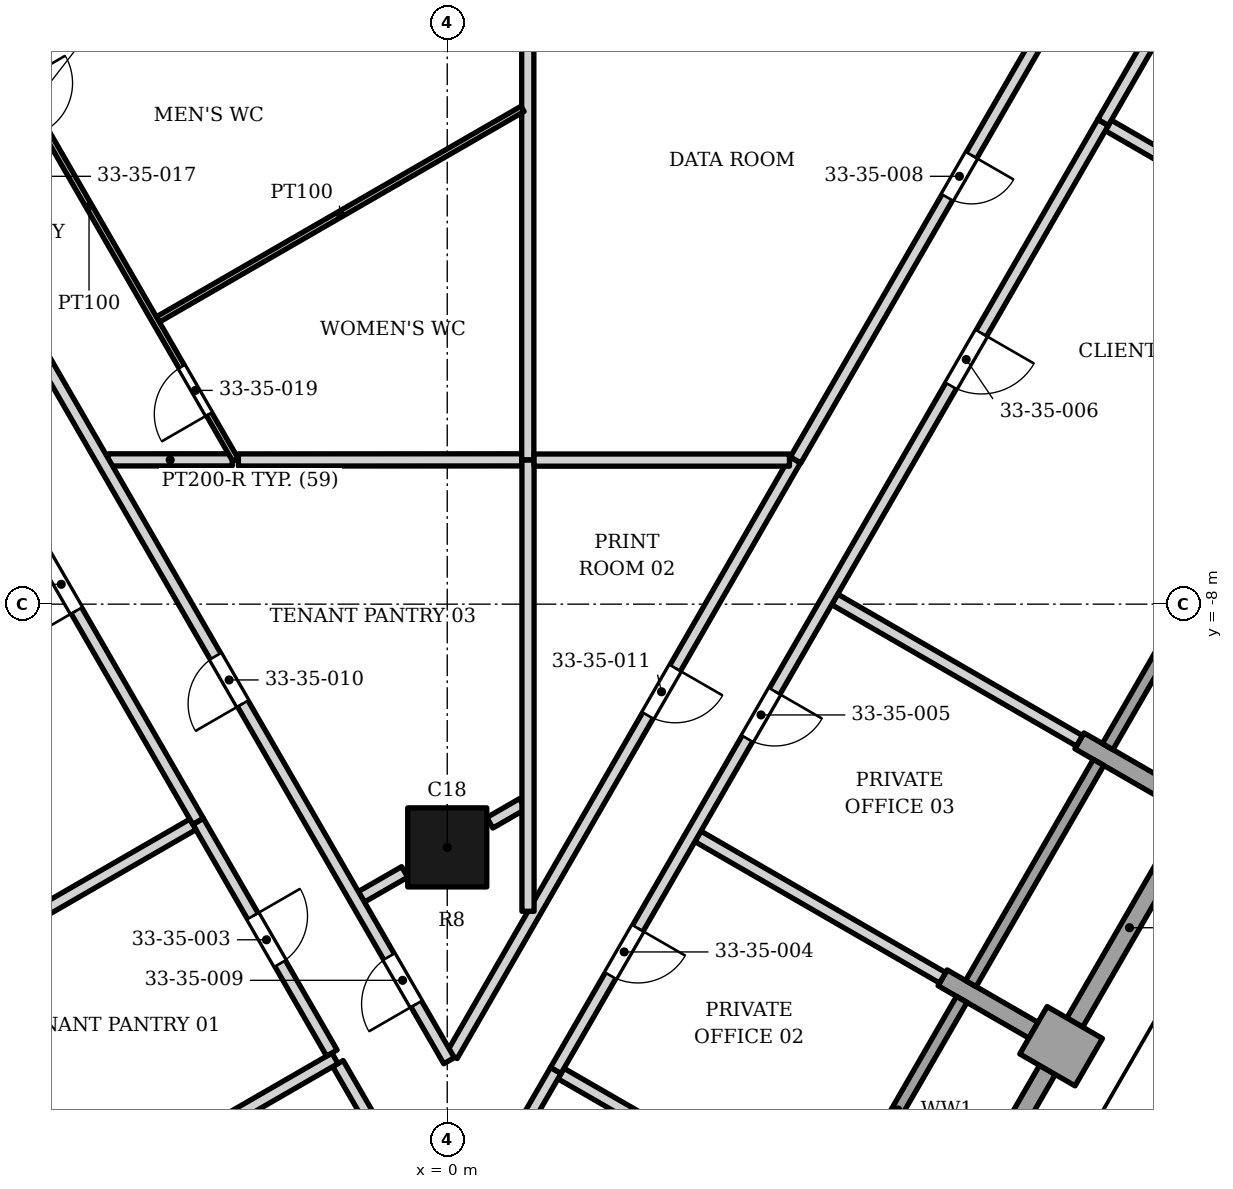
"""IFC4 building model, lengths in metres.
Left out: names, types, materials, properties, quantities, classifications, styles, units other than length and angle.
Written with IfcOpenShell. Run it as: python <this file> out.ifc"""

import sys

from ifc_helpers import new_model, si_unit, direction, frame, frame_2d, origin, origin_2d, place, context, subcontext, project, spatial, rectangle, extrude, element, fill, save


model = new_model("IFC4")
c1 = context("Model", 3, precision=1e-05, world=origin(), true_north=direction((0.0, 1.0)))
c2 = subcontext(c1, "Body", "Model", "MODEL_VIEW")
j1 = project(units=[si_unit("LENGTHUNIT", "METRE"), si_unit("PLANEANGLEUNIT", "RADIAN")], contexts=[c1])
p1 = place(None, origin())
s1 = spatial("IfcSite", under=j1, at=p1, CompositionType="ELEMENT")
p2 = place(p1, origin())
s2 = spatial("IfcBuilding", under=s1, at=p2, CompositionType="ELEMENT")
p3 = place(p2, frame((0.0, 0.0, 144.6)))
s3 = spatial("IfcBuildingStorey", under=s2, at=p3, CompositionType="ELEMENT", Elevation=144.6)
p4 = place(p3, frame((0.0, -12.0, 0.0), z_axis=(0.0, 0.0, 1.0), x_axis=(1.0, 0.0, 0.0)))
e1 = element("IfcColumn", 1, at=p4, inside=s3, PredefinedType="COLUMN", context=c2, shape_type="SweptSolid", body=[
    extrude(rectangle(XDim=1.3, YDim=1.3, at=origin_2d()), origin(), (0.0, 0.0, 1.0), 3.9),
])
p5 = place(p3, frame((9.641, -15.007, 0.0), z_axis=(0.0, 0.0, 1.0), x_axis=(0.866088799389, -0.499890179513, 0.0)))
e2 = element("IfcWall", 2, at=p5, inside=s3, PredefinedType="SOLIDWALL", context=c2, shape_type="SweptSolid", body=[
    extrude(rectangle(XDim=1.05, YDim=0.9, at=frame_2d((0.525, 0.0))), origin(), (0.0, 0.0, 1.0), 3.0),
])
for number, where, z_axis, x_axis in (
    (3, (9.641, -15.007, 0.0), (0.0, 0.0, 1.0), (-0.866, 0.5, 0.0)),
    (4, (11.891, -11.11, 0.0), (0.0, 0.0, 1.0), (-0.866, 0.5, 0.0)),
):
    element("IfcWall", number, at=place(p3, frame(where, z_axis=z_axis, x_axis=x_axis)), inside=s3, PredefinedType="SOLIDWALL", context=c2, shape_type="SweptSolid", body=[
        extrude(rectangle(XDim=1.725, YDim=0.3, at=frame_2d((0.863, 0.0))), origin(), (0.0, 0.0, 1.0), 3.0),
    ])
p6 = place(p3, frame((8.071, -18.777, 0.0), z_axis=(0.0, 0.0, 1.0), x_axis=(0.500012057535, 0.866018442252, 0.0)))
e5 = element("IfcWall", 5, at=p6, inside=s3, PredefinedType="SOLIDWALL", context=c2, shape_type="SweptSolid", body=[
    extrude(rectangle(XDim=3.6, YDim=0.3, at=frame_2d((1.8, 0.0))), origin(), (0.0, 0.0, 1.0), 3.0),
])
p7 = place(p3, frame((6.362, -18.137, 0.0), z_axis=(0.0, 0.0, 1.0), x_axis=(0.500002543286, 0.866023935413, 0.0)))
e6 = element("IfcWall", 6, at=p7, inside=s3, PredefinedType="ELEMENTEDWALL", context=c2, shape_type="SweptSolid", body=[
    extrude(rectangle(XDim=4.2, YDim=0.2, at=frame_2d((2.1, 0.0))), origin(), (0.0, 0.0, 1.0), 3.0),
])
p8 = place(p3, frame((10.321, -14.88, 0.0), z_axis=(0.0, 0.0, 1.0), x_axis=(0.500012057535, 0.866018442252, 0.0)))
e7 = element("IfcWall", 7, at=p8, inside=s3, PredefinedType="SOLIDWALL", context=c2, shape_type="SweptSolid", body=[
    extrude(rectangle(XDim=3.6, YDim=0.3, at=frame_2d((1.8, 0.0))), origin(), (0.0, 0.0, 1.0), 2.95),
])
p9 = place(p3, frame((8.612, -14.24, 0.0), z_axis=(0.0, 0.0, 1.0), x_axis=(0.500027713859, 0.866009402589, 0.0)))
e8 = element("IfcWall", 8, at=p9, inside=s3, PredefinedType="ELEMENTEDWALL", context=c2, shape_type="SweptSolid", body=[
    extrude(rectangle(XDim=4.2, YDim=0.2, at=frame_2d((2.1, 0.0))), origin(), (0.0, 0.0, 1.0), 2.95),
])
p10 = place(p3, frame((10.862, -10.343, 0.0), z_axis=(0.0, 0.0, 1.0), x_axis=(0.500002543286, 0.866023935413, 0.0)))
e9 = element("IfcWall", 9, at=p10, inside=s3, PredefinedType="ELEMENTEDWALL", context=c2, shape_type="SweptSolid", body=[
    extrude(rectangle(XDim=4.2, YDim=0.2, at=frame_2d((2.1, 0.0))), origin(), (0.0, 0.0, 1.0), 3.0),
])
p11 = place(p3, frame((-1.798, -15.555, 0.0), z_axis=(0.0, 0.0, 1.0), x_axis=(0.500381369408, -0.865805108064, 0.0)))
e10 = element("IfcWall", 10, at=p11, inside=s3, PredefinedType="PARTITIONING", context=c2, shape_type="SweptSolid", body=[
    extrude(rectangle(XDim=3.645, YDim=0.2, at=frame_2d((1.823, 0.0))), origin(), (0.0, 0.0, 1.0), 3.128),
])
p12 = place(p11, frame((1.745, 0.0, 0.0)))
e11 = element("IfcOpeningElement", 11, at=p12, cuts=e10, PredefinedType="OPENING", context=c2, shape_type="SweptSolid", body=[
    extrude(rectangle(XDim=1.2, YDim=2.4, at=frame_2d((0.6, 1.2))), frame((0.0, 0.11, 0.0), z_axis=(0.0, -1.0, 0.0), x_axis=(1.0, 0.0, 0.0)), (0.0, 0.0, 1.0), 0.22),
])
p13 = place(p3, frame((1.869, -15.719, 0.0), z_axis=(0.0, 0.0, 1.0), x_axis=(0.866183837695, -0.499725483956, 0.0)))
e12 = element("IfcWall", 12, at=p13, inside=s3, PredefinedType="PARTITIONING", context=c2, shape_type="SweptSolid", body=[
    extrude(rectangle(XDim=4.649, YDim=0.2, at=frame_2d((2.325, 0.0))), origin(), (0.0, 0.0, 1.0), 3.052),
])
p14 = place(p3, frame((0.076, -18.624, 0.0), z_axis=(0.0, 0.0, 1.0), x_axis=(0.500452706258, 0.865763875892, 0.0)))
e13 = element("IfcWall", 13, at=p14, inside=s3, PredefinedType="PARTITIONING", context=c2, shape_type="SweptSolid", body=[
    extrude(rectangle(XDim=3.414, YDim=0.2, at=frame_2d((1.707, 0.0))), origin(), (0.0, 0.0, 1.0), 3.128),
])
p15 = place(p3, frame((-6.306, -18.042, 0.0), z_axis=(0.0, 0.0, 1.0), x_axis=(0.86617295725, 0.499744342768, 0.0)))
e14 = element("IfcWall", 14, at=p15, inside=s3, PredefinedType="PARTITIONING", context=c2, shape_type="SweptSolid", body=[
    extrude(rectangle(XDim=5.15, YDim=0.2, at=frame_2d((2.575, 0.0))), origin(), (0.0, 0.0, 1.0), 3.052),
])
p16 = place(p3, frame((0.076, -15.423, 0.0), z_axis=(0.0, 0.0, 1.0), x_axis=(0.499393409799, 0.866375335666, 0.0)))
e15 = element("IfcWall", 15, at=p16, inside=s3, PredefinedType="PARTITIONING", context=c2, shape_type="SweptSolid", body=[
    extrude(rectangle(XDim=11.306, YDim=0.2, at=frame_2d((5.653, 0.0))), origin(), (0.0, 0.0, 1.0), 2.884),
])
p17 = place(p16, frame((6.455, 0.0, 0.0)))
e16 = element("IfcOpeningElement", 16, at=p17, cuts=e15, PredefinedType="OPENING", context=c2, shape_type="SweptSolid", body=[
    extrude(rectangle(XDim=0.9, YDim=2.1, at=frame_2d((0.45, 1.05))), frame((0.0, 0.11, 0.0), z_axis=(0.0, -1.0, 0.0), x_axis=(1.0, 0.0, 0.0)), (0.0, 0.0, 1.0), 0.22),
])
p18 = place(p3, frame((-4.097, -11.573, 0.0), z_axis=(0.0, 0.0, 1.0), x_axis=(0.500013981145, -0.866017331616, 0.0)))
e17 = element("IfcWall", 17, at=p18, inside=s3, PredefinedType="PARTITIONING", context=c2, shape_type="SweptSolid", body=[
    extrude(rectangle(XDim=4.398, YDim=0.2, at=frame_2d((2.199, 0.0))), origin(), (0.0, 0.0, 1.0), 2.95),
])
p19 = place(p18, frame((1.798, 0.0, 0.0)))
e18 = element("IfcOpeningElement", 18, at=p19, cuts=e17, PredefinedType="OPENING", context=c2, shape_type="SweptSolid", body=[
    extrude(rectangle(XDim=0.9, YDim=2.1, at=frame_2d((0.45, 1.05))), frame((0.0, 0.11, 0.0), z_axis=(0.0, -1.0, 0.0), x_axis=(1.0, 0.0, 0.0)), (0.0, 0.0, 1.0), 0.22),
])
p20 = place(p3, frame((-1.413, -12.814, 0.0), z_axis=(0.0, 0.0, 1.0), x_axis=(0.866906303058, 0.498471124258, 0.0)))
e19 = element("IfcWall", 19, at=p20, inside=s3, PredefinedType="PARTITIONING", context=c2, shape_type="SweptSolid", body=[
    extrude(rectangle(XDim=0.822, YDim=0.2, at=frame_2d((0.411, 0.0))), origin(), (0.0, 0.0, 1.0), 3.73),
])
p21 = place(p3, frame((4.121, -11.818, 0.0), z_axis=(0.0, 0.0, 1.0), x_axis=(0.865845361661, -0.500311712526, 0.0)))
e20 = element("IfcWall", 20, at=p21, inside=s3, PredefinedType="PARTITIONING", context=c2, shape_type="SweptSolid", body=[
    extrude(rectangle(XDim=4.65, YDim=0.2, at=frame_2d((2.325, 0.0))), origin(), (0.0, 0.0, 1.0), 2.884),
])
p22 = place(p3, frame((-8.556, -14.145, 0.0), z_axis=(0.0, 0.0, 1.0), x_axis=(0.866191221831, 0.499712684673, 0.0)))
e21 = element("IfcWall", 21, at=p22, inside=s3, PredefinedType="PARTITIONING", context=c2, shape_type="SweptSolid", body=[
    extrude(rectangle(XDim=5.048, YDim=0.2, at=frame_2d((2.524, 0.0))), origin(), (0.0, 0.0, 1.0), 2.884),
])
p23 = place(p3, frame((0.7, -11.596, 0.0), z_axis=(0.0, 0.0, 1.0), x_axis=(0.866015917575, 0.500016430238, 0.0)))
e22 = element("IfcWall", 22, at=p23, inside=s3, PredefinedType="PARTITIONING", context=c2, shape_type="SweptSolid", body=[
    extrude(rectangle(XDim=0.623, YDim=0.2, at=frame_2d((0.312, 0.0))), origin(), (0.0, 0.0, 1.0), 3.73),
])
p24 = place(p3, frame((-10.848, 0.121, 0.0), z_axis=(0.0, 0.0, 1.0), x_axis=(0.499997969693, -0.866026575979, 0.0)))
e23 = element("IfcWall", 23, at=p24, inside=s3, PredefinedType="PARTITIONING", context=c2, shape_type="SweptSolid", body=[
    extrude(rectangle(XDim=13.5, YDim=0.2, at=frame_2d((6.75, 0.0))), origin(), (0.0, 0.0, 1.0), 2.884),
])
p25 = place(p24, frame((1.8, 0.0, 0.0)))
e24 = element("IfcOpeningElement", 24, at=p25, cuts=e23, PredefinedType="OPENING", context=c2, shape_type="SweptSolid", body=[
    extrude(rectangle(XDim=0.9, YDim=2.1, at=frame_2d((0.45, 1.05))), frame((0.0, 0.11, 0.0), z_axis=(0.0, -1.0, 0.0), x_axis=(1.0, 0.0, 0.0)), (0.0, 0.0, 1.0), 0.22),
])
p26 = place(p24, frame((8.5, 0.0, 0.0)))
e25 = element("IfcOpeningElement", 25, at=p26, cuts=e23, PredefinedType="OPENING", context=c2, shape_type="SweptSolid", body=[
    extrude(rectangle(XDim=1.0, YDim=2.1, at=frame_2d((0.5, 1.05))), frame((0.0, 0.11, 0.0), z_axis=(0.0, -1.0, 0.0), x_axis=(1.0, 0.0, 0.0)), (0.0, 0.0, 1.0), 0.22),
])
p27 = place(p3, frame((6.371, -7.921, 0.0), z_axis=(0.0, 0.0, 1.0), x_axis=(0.865845361661, -0.500311712526, 0.0)))
e26 = element("IfcWall", 26, at=p27, inside=s3, PredefinedType="PARTITIONING", context=c2, shape_type="SweptSolid", body=[
    extrude(rectangle(XDim=4.65, YDim=0.2, at=frame_2d((2.325, 0.0))), origin(), (0.0, 0.0, 1.0), 3.052),
])
p28 = place(p3, frame((-5.577, -5.627, 0.0), z_axis=(0.0, 0.0, 1.0), x_axis=(1.0, 0.0, 0.0)))
e27 = element("IfcWall", 27, at=p28, inside=s3, PredefinedType="PARTITIONING", context=c2, shape_type="SweptSolid", body=[
    extrude(rectangle(XDim=2.042, YDim=0.2, at=frame_2d((1.021, 0.0))), origin(), (0.0, 0.0, 1.0), 3.73),
])
p29 = place(p3, frame((-3.435, -5.629, 0.0), z_axis=(0.0, 0.0, 1.0), x_axis=(0.999999932729, 0.000366799388, 0.0)))
e28 = element("IfcWall", 28, at=p29, inside=s3, PredefinedType="PARTITIONING", context=c2, shape_type="SweptSolid", body=[
    extrude(rectangle(XDim=4.659, YDim=0.2, at=frame_2d((2.33, 0.0))), origin(), (0.0, 0.0, 1.0), 3.73),
])
p30 = place(p3, frame((1.324, -5.627, 0.0), z_axis=(0.0, 0.0, 1.0), x_axis=(0.0, 1.0, 0.0)))
e29 = element("IfcWall", 29, at=p30, inside=s3, PredefinedType="PARTITIONING", context=c2, shape_type="SweptSolid", body=[
    extrude(rectangle(XDim=8.078, YDim=0.2, at=frame_2d((4.039, 0.0))), origin(), (0.0, 0.0, 1.0), 3.73),
])
p31 = place(p3, frame((1.328, -13.051, 0.0), z_axis=(0.0, 0.0, 1.0), x_axis=(0.0, 1.0, 0.0)))
e30 = element("IfcWall", 30, at=p31, inside=s3, PredefinedType="PARTITIONING", context=c2, shape_type="SweptSolid", body=[
    extrude(rectangle(XDim=7.42, YDim=0.2, at=frame_2d((3.71, 0.0))), origin(), (0.0, 0.0, 1.0), 2.95),
])
p32 = place(p3, frame((1.428, -5.631, 0.0), z_axis=(0.0, 0.0, 1.0), x_axis=(1.0, 0.0, 0.0)))
e31 = element("IfcWall", 31, at=p32, inside=s3, PredefinedType="PARTITIONING", context=c2, shape_type="SweptSolid", body=[
    extrude(rectangle(XDim=4.199, YDim=0.2, at=frame_2d((2.1, 0.0))), origin(), (0.0, 0.0, 1.0), 2.884),
])
p33 = place(p3, frame((5.729, -5.629, 0.0), z_axis=(0.0, 0.0, 1.0), x_axis=(0.500143553768, 0.865942507113, 0.0)))
e32 = element("IfcWall", 32, at=p33, inside=s3, PredefinedType="PARTITIONING", context=c2, shape_type="SweptSolid", body=[
    extrude(rectangle(XDim=10.773, YDim=0.2, at=frame_2d((5.386, 0.0))), origin(), (0.0, 0.0, 1.0), 3.052),
])
p34 = place(p33, frame((4.987, 0.0, 0.0)))
e33 = element("IfcOpeningElement", 33, at=p34, cuts=e32, PredefinedType="OPENING", context=c2, shape_type="SweptSolid", body=[
    extrude(rectangle(XDim=0.8, YDim=2.1, at=frame_2d((0.4, 1.05))), frame((0.0, 0.11, 0.0), z_axis=(0.0, -1.0, 0.0), x_axis=(1.0, 0.0, 0.0)), (0.0, 0.0, 1.0), 0.22),
])
p35 = place(p3, frame((10.873, -0.128, 0.0), z_axis=(0.0, 0.0, 1.0), x_axis=(0.86585748916, -0.500290723946, 0.0)))
e34 = element("IfcWall", 34, at=p35, inside=s3, PredefinedType="PARTITIONING", context=c2, shape_type="SweptSolid", body=[
    extrude(rectangle(XDim=4.648, YDim=0.2, at=frame_2d((2.324, 0.0))), origin(), (0.0, 0.0, 1.0), 3.052),
])
p36 = place(p3, frame((1.785, -15.668, 0.0), z_axis=(0.0, 0.0, 1.0), x_axis=(0.5000018851, 0.866024315419, 0.0)))
e35 = element("IfcWall", 35, at=p36, inside=s3, PredefinedType="PARTITIONING", context=c2, shape_type="SweptSolid", body=[
    extrude(rectangle(XDim=18.0, YDim=0.2, at=frame_2d((9.0, 0.0))), origin(), (0.0, 0.0, 1.0), 2.884),
])
p37 = place(p36, frame((1.8, 0.0, 0.0)))
e36 = element("IfcOpeningElement", 36, at=p37, cuts=e35, PredefinedType="OPENING", context=c2, shape_type="SweptSolid", body=[
    extrude(rectangle(XDim=0.9, YDim=2.1, at=frame_2d((0.45, 1.05))), frame((0.0, 0.11, 0.0), z_axis=(0.0, -1.0, 0.0), x_axis=(1.0, 0.0, 0.0)), (0.0, 0.0, 1.0), 0.22),
])
p38 = place(p36, frame((6.3, 0.0, 0.0)))
e37 = element("IfcOpeningElement", 37, at=p38, cuts=e35, PredefinedType="OPENING", context=c2, shape_type="SweptSolid", body=[
    extrude(rectangle(XDim=0.9, YDim=2.1, at=frame_2d((0.45, 1.05))), frame((0.0, 0.11, 0.0), z_axis=(0.0, -1.0, 0.0), x_axis=(1.0, 0.0, 0.0)), (0.0, 0.0, 1.0), 0.22),
])
p39 = place(p36, frame((13.0, 0.0, 0.0)))
e38 = element("IfcOpeningElement", 38, at=p39, cuts=e35, PredefinedType="OPENING", context=c2, shape_type="SweptSolid", body=[
    extrude(rectangle(XDim=1.0, YDim=2.1, at=frame_2d((0.5, 1.05))), frame((0.0, 0.11, 0.0), z_axis=(0.0, -1.0, 0.0), x_axis=(1.0, 0.0, 0.0)), (0.0, 0.0, 1.0), 0.22),
])
p40 = place(p3, frame((-4.759, -3.318, 0.0), z_axis=(0.0, 0.0, 1.0), x_axis=(0.866002450397, 0.500039754326, 0.0)))
e39 = element("IfcWall", 39, at=p40, inside=s3, PredefinedType="PARTITIONING", context=c2, shape_type="SweptSolid", body=[
    extrude(rectangle(XDim=6.927, YDim=0.1, at=frame_2d((3.463, 0.0))), origin(), (0.0, 0.0, 1.0), 2.884),
])
p41 = place(p3, frame((-8.3, 2.712, 0.0), z_axis=(0.0, 0.0, 1.0), x_axis=(0.500225649327, -0.865895085882, 0.0)))
e40 = element("IfcWall", 40, at=p41, inside=s3, PredefinedType="PARTITIONING", context=c2, shape_type="SweptSolid", body=[
    extrude(rectangle(XDim=9.631, YDim=0.1, at=frame_2d((4.815, 0.0))), origin(), (0.0, 0.0, 1.0), 2.884),
])
p42 = place(p41, frame((2.475, 0.0, 0.0)))
e41 = element("IfcOpeningElement", 41, at=p42, cuts=e40, PredefinedType="OPENING", context=c2, shape_type="SweptSolid", body=[
    extrude(rectangle(XDim=0.9, YDim=2.1, at=frame_2d((0.45, 1.05))), frame((0.0, 0.06, 0.0), z_axis=(0.0, -1.0, 0.0), x_axis=(1.0, 0.0, 0.0)), (0.0, 0.0, 1.0), 0.12),
])
p43 = place(p41, frame((7.861, 0.0, 0.0)))
e42 = element("IfcOpeningElement", 42, at=p43, cuts=e40, PredefinedType="OPENING", context=c2, shape_type="SweptSolid", body=[
    extrude(rectangle(XDim=0.9, YDim=2.1, at=frame_2d((0.45, 1.05))), frame((0.0, 0.06, 0.0), z_axis=(0.0, -1.0, 0.0), x_axis=(1.0, 0.0, 0.0)), (0.0, 0.0, 1.0), 0.12),
])
p44 = place(p3, frame((-11.064, 3.7, 0.0), z_axis=(0.0, 0.0, 1.0), x_axis=(0.500140059959, -0.865944525027, 0.0)))
e43 = element("IfcWall", 43, at=p44, inside=s3, PredefinedType="PARTITIONING", context=c2, shape_type="SweptSolid", body=[
    extrude(rectangle(XDim=22.181, YDim=0.2, at=frame_2d((11.091, 0.0))), origin(), (0.0, 0.0, 1.0), 2.884),
])
p45 = place(p44, frame((20.205, 0.0, 0.0)))
e44 = element("IfcOpeningElement", 44, at=p45, cuts=e43, PredefinedType="OPENING", context=c2, shape_type="SweptSolid", body=[
    extrude(rectangle(XDim=0.9, YDim=2.1, at=frame_2d((0.45, 1.05))), frame((0.0, 0.11, 0.0), z_axis=(0.0, -1.0, 0.0), x_axis=(1.0, 0.0, 0.0)), (0.0, 0.0, 1.0), 0.22),
])
p46 = place(p44, frame((14.5, 0.0, 0.0)))
e45 = element("IfcOpeningElement", 45, at=p46, cuts=e43, PredefinedType="OPENING", context=c2, shape_type="SweptSolid", body=[
    extrude(rectangle(XDim=0.9, YDim=2.1, at=frame_2d((0.45, 1.05))), frame((0.0, 0.11, 0.0), z_axis=(0.0, -1.0, 0.0), x_axis=(1.0, 0.0, 0.0)), (0.0, 0.0, 1.0), 0.22),
])
p47 = place(p44, frame((4.886, 0.0, 0.0)))
e46 = element("IfcOpeningElement", 46, at=p47, cuts=e43, PredefinedType="OPENING", context=c2, shape_type="SweptSolid", body=[
    extrude(rectangle(XDim=1.0, YDim=2.1, at=frame_2d((0.5, 1.05))), frame((0.0, 0.11, 0.0), z_axis=(0.0, -1.0, 0.0), x_axis=(1.0, 0.0, 0.0)), (0.0, 0.0, 1.0), 0.22),
])
p48 = place(p3, frame((10.786, -0.078, 0.0), z_axis=(0.0, 0.0, 1.0), x_axis=(0.499631976044, 0.866237778277, 0.0)))
e47 = element("IfcWall", 47, at=p48, inside=s3, PredefinedType="PARTITIONING", context=c2, shape_type="SweptSolid", body=[
    extrude(rectangle(XDim=4.361, YDim=0.2, at=frame_2d((2.18, 0.0))), origin(), (0.0, 0.0, 1.0), 3.73),
])
p49 = place(p48, frame((1.729, 0.0, 0.0)))
e48 = element("IfcOpeningElement", 48, at=p49, cuts=e47, PredefinedType="OPENING", context=c2, shape_type="SweptSolid", body=[
    extrude(rectangle(XDim=0.9, YDim=2.1, at=frame_2d((0.45, 1.05))), frame((0.0, 0.11, 0.0), z_axis=(0.0, -1.0, 0.0), x_axis=(1.0, 0.0, 0.0)), (0.0, 0.0, 1.0), 0.22),
])
p50 = place(p26, origin())
e49 = element("IfcDoor", 49, at=p50, inside=s3, OperationType="SINGLE_SWING_RIGHT", PredefinedType="DOOR", context=c2, shape_type="SweptSolid", body=[
    extrude(rectangle(XDim=1.0, YDim=2.1, at=frame_2d((0.5, 1.05))), frame((0.0, 0.025, 0.0), z_axis=(0.0, -1.0, 0.0), x_axis=(1.0, 0.0, 0.0)), (0.0, 0.0, 1.0), 0.05),
])
fill(e25, e49)
p51 = place(p19, origin())
e50 = element("IfcDoor", 50, at=p51, inside=s3, OperationType="SINGLE_SWING_LEFT", PredefinedType="DOOR", context=c2, shape_type="SweptSolid", body=[
    extrude(rectangle(XDim=0.9, YDim=2.1, at=frame_2d((0.45, 1.05))), frame((0.0, 0.025, 0.0), z_axis=(0.0, -1.0, 0.0), x_axis=(1.0, 0.0, 0.0)), (0.0, 0.0, 1.0), 0.05),
])
fill(e18, e50)
p52 = place(p37, origin())
e51 = element("IfcDoor", 51, at=p52, inside=s3, OperationType="SINGLE_SWING_RIGHT", PredefinedType="DOOR", context=c2, shape_type="SweptSolid", body=[
    extrude(rectangle(XDim=0.9, YDim=2.1, at=frame_2d((0.45, 1.05))), frame((0.0, 0.025, 0.0), z_axis=(0.0, -1.0, 0.0), x_axis=(1.0, 0.0, 0.0)), (0.0, 0.0, 1.0), 0.05),
])
fill(e36, e51)
p53 = place(p38, origin())
e52 = element("IfcDoor", 52, at=p53, inside=s3, OperationType="SINGLE_SWING_RIGHT", PredefinedType="DOOR", context=c2, shape_type="SweptSolid", body=[
    extrude(rectangle(XDim=0.9, YDim=2.1, at=frame_2d((0.45, 1.05))), frame((0.0, 0.025, 0.0), z_axis=(0.0, -1.0, 0.0), x_axis=(1.0, 0.0, 0.0)), (0.0, 0.0, 1.0), 0.05),
])
fill(e37, e52)
p54 = place(p39, origin())
e53 = element("IfcDoor", 53, at=p54, inside=s3, OperationType="SINGLE_SWING_RIGHT", PredefinedType="DOOR", context=c2, shape_type="SweptSolid", body=[
    extrude(rectangle(XDim=1.0, YDim=2.1, at=frame_2d((0.5, 1.05))), frame((0.0, 0.025, 0.0), z_axis=(0.0, -1.0, 0.0), x_axis=(1.0, 0.0, 0.0)), (0.0, 0.0, 1.0), 0.05),
])
fill(e38, e53)
p55 = place(p34, origin())
e54 = element("IfcDoor", 54, at=p55, inside=s3, OperationType="SINGLE_SWING_RIGHT", PredefinedType="DOOR", context=c2, shape_type="SweptSolid", body=[
    extrude(rectangle(XDim=0.8, YDim=2.1, at=frame_2d((0.4, 1.05))), frame((0.0, 0.025, 0.0), z_axis=(0.0, -1.0, 0.0), x_axis=(1.0, 0.0, 0.0)), (0.0, 0.0, 1.0), 0.05),
])
fill(e33, e54)
p56 = place(p45, origin())
e55 = element("IfcDoor", 55, at=p56, inside=s3, OperationType="SINGLE_SWING_RIGHT", PredefinedType="DOOR", context=c2, shape_type="SweptSolid", body=[
    extrude(rectangle(XDim=0.9, YDim=2.1, at=frame_2d((0.45, 1.05))), frame((0.0, 0.025, 0.0), z_axis=(0.0, -1.0, 0.0), x_axis=(1.0, 0.0, 0.0)), (0.0, 0.0, 1.0), 0.05),
])
fill(e44, e55)
p57 = place(p46, origin())
e56 = element("IfcDoor", 56, at=p57, inside=s3, OperationType="SINGLE_SWING_RIGHT", PredefinedType="DOOR", context=c2, shape_type="SweptSolid", body=[
    extrude(rectangle(XDim=0.9, YDim=2.1, at=frame_2d((0.45, 1.05))), frame((0.0, 0.025, 0.0), z_axis=(0.0, -1.0, 0.0), x_axis=(1.0, 0.0, 0.0)), (0.0, 0.0, 1.0), 0.05),
])
fill(e45, e56)
p58 = place(p17, origin())
e57 = element("IfcDoor", 57, at=p58, inside=s3, OperationType="SINGLE_SWING_RIGHT", PredefinedType="DOOR", context=c2, shape_type="SweptSolid", body=[
    extrude(rectangle(XDim=0.9, YDim=2.1, at=frame_2d((0.45, 1.05))), frame((0.0, 0.025, 0.0), z_axis=(0.0, -1.0, 0.0), x_axis=(1.0, 0.0, 0.0)), (0.0, 0.0, 1.0), 0.05),
])
fill(e16, e57)
p59 = place(p43, origin())
e58 = element("IfcDoor", 58, at=p59, inside=s3, OperationType="SINGLE_SWING_RIGHT", PredefinedType="DOOR", context=c2, shape_type="SweptSolid", body=[
    extrude(rectangle(XDim=0.9, YDim=2.1, at=frame_2d((0.45, 1.05))), frame((0.0, 0.025, 0.0), z_axis=(0.0, -1.0, 0.0), x_axis=(1.0, 0.0, 0.0)), (0.0, 0.0, 1.0), 0.05),
])
fill(e42, e58)
save(model, sys.argv[1])
